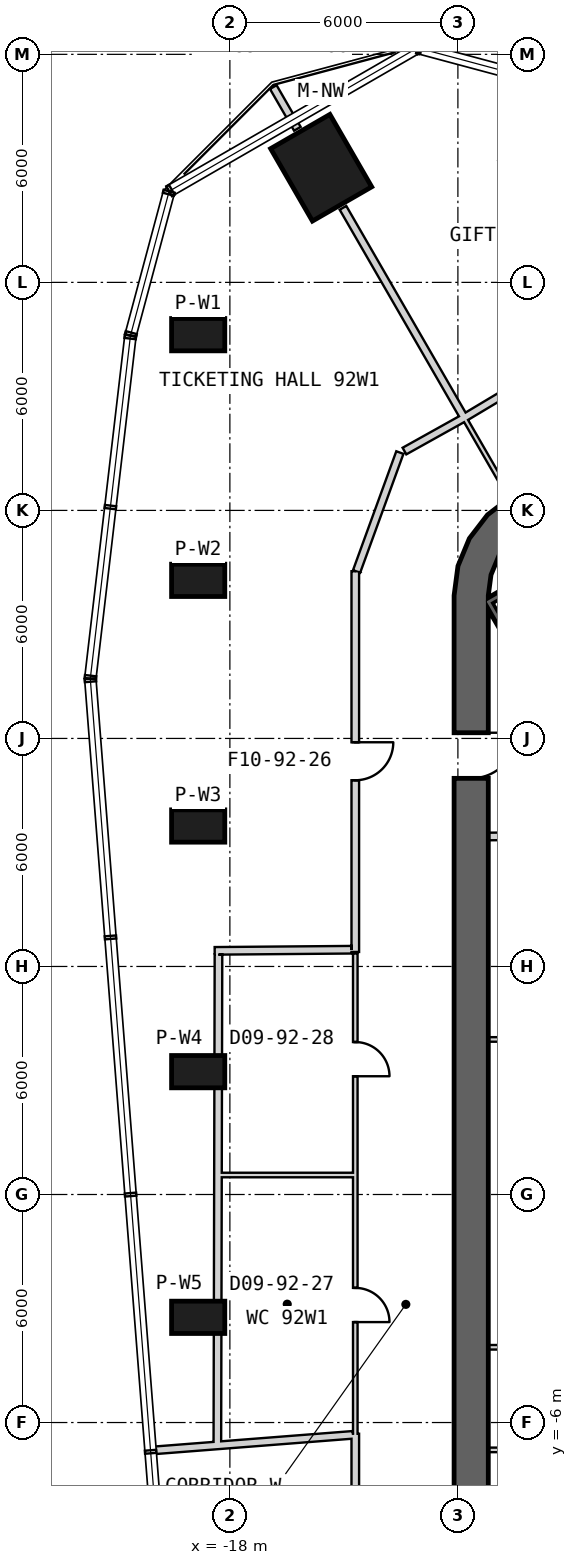
"""IFC4 building model, lengths in metres.
Left out: names, types, materials, properties, quantities, classifications, styles, units other than length and angle.
Written with IfcOpenShell. Run it as: python <this file> out.ifc"""

import sys

from ifc_helpers import new_model, si_unit, direction, frame, frame_2d, origin, origin_2d, place, context, subcontext, project, spatial, polyline, rectangle, outline, extrude, element, fill, save


model = new_model("IFC4")
c1 = context("Model", 3, precision=1e-05, world=origin(), true_north=direction((0.0, 1.0)))
c2 = subcontext(c1, "Body", "Model", "MODEL_VIEW")
j1 = project(units=[si_unit("LENGTHUNIT", "METRE"), si_unit("PLANEANGLEUNIT", "RADIAN")], contexts=[c1])
p1 = place(None, origin())
s1 = spatial("IfcSite", under=j1, at=p1, CompositionType="ELEMENT")
p2 = place(p1, origin())
s2 = spatial("IfcBuilding", under=s1, at=p2, CompositionType="ELEMENT")
p3 = place(p2, frame((0.0, 0.0, 404.8)))
s3 = spatial("IfcBuildingStorey", under=s2, at=p3, CompositionType="ELEMENT", Elevation=404.8)
p4 = place(p3, frame((-15.598, 27.016, 0.0), z_axis=(0.0, 0.0, 1.0), x_axis=(-0.5, 0.866025403784, 0.0)))
e1 = element("IfcColumn", 1, at=p4, inside=s3, PredefinedType="COLUMN", context=c2, shape_type="SweptSolid", body=[
    extrude(rectangle(XDim=2.2, YDim=1.8, at=origin_2d()), origin(), (0.0, 0.0, 1.0), 5.25),
])
for number, where, z_axis, x_axis in (
    (2, (-18.834, 22.624, 0.0), (0.0, 0.0, 1.0), (-1.0, 0.0, 0.0)),
    (3, (-18.834, 16.16, 0.0), (0.0, 0.0, 1.0), (-1.0, 0.0, 0.0)),
    (4, (-18.834, 9.696, 0.0), (0.0, 0.0, 1.0), (-1.0, 0.0, 0.0)),
    (5, (-18.834, 3.232, 0.0), (0.0, 0.0, 1.0), (-1.0, 0.0, 0.0)),
    (6, (-18.834, -3.232, 0.0), (0.0, 0.0, 1.0), (-1.0, 0.0, 0.0)),
):
    element("IfcColumn", number, at=place(p3, frame(where, z_axis=z_axis, x_axis=x_axis)), inside=s3, PredefinedType="COLUMN", context=c2, shape_type="SweptSolid", body=[
        extrude(rectangle(XDim=1.4, YDim=0.85, at=origin_2d()), origin(), (0.0, 0.0, 1.0), 5.25),
    ])
p5 = place(p3, frame((-11.65, 15.762, 0.0), z_axis=(0.0, 0.0, 1.0), x_axis=(0.0, -1.0, 0.0)))
e7 = element("IfcWall", 7, at=p5, inside=s3, PredefinedType="SHEAR", context=c2, shape_type="SweptSolid", body=[
    extrude(rectangle(XDim=31.523, YDim=0.9, at=frame_2d((15.762, 0.0))), origin(), (0.0, 0.0, 1.0), 5.5),
])
p6 = place(p5, frame((3.612, 0.0, 0.0)))
e8 = element("IfcOpeningElement", 8, at=p6, cuts=e7, PredefinedType="OPENING", context=c2, shape_type="SweptSolid", body=[
    extrude(rectangle(XDim=1.2, YDim=2.4, at=frame_2d((0.6, 1.2))), frame((0.0, 0.46, 0.0), z_axis=(0.0, -1.0, 0.0), x_axis=(1.0, 0.0, 0.0)), (0.0, 0.0, 1.0), 0.92),
])
p7 = place(p5, frame((26.712, 0.0, 0.0)))
e9 = element("IfcOpeningElement", 9, at=p7, cuts=e7, PredefinedType="OPENING", context=c2, shape_type="SweptSolid", body=[
    extrude(rectangle(XDim=1.2, YDim=2.4, at=frame_2d((0.6, 1.2))), frame((0.0, 0.46, 0.0), z_axis=(0.0, -1.0, 0.0), x_axis=(1.0, 0.0, 0.0)), (0.0, 0.0, 1.0), 0.92),
])
p8 = place(p3, origin())
e10 = element("IfcWall", 10, at=p8, inside=s3, PredefinedType="SHEAR", context=c2, shape_type="SweptSolid", body=[
    extrude(outline(polyline([(-7.6, 18.36), (-8.323, 18.659), (-9.1, 18.762), (-9.876, 18.659), (-10.6, 18.36), (-11.221, 17.883), (-11.698, 17.262), (-11.998, 16.538), (-12.1, 15.762), (-11.2, 15.762), (-11.128, 16.305), (-10.919, 16.812), (-10.585, 17.247), (-10.15, 17.58), (-9.644, 17.79), (-9.1, 17.862), (-8.556, 17.79), (-8.05, 17.58), (-7.6, 18.36)])), origin(), (0.0, 0.0, 1.0), 5.5),
])
p9 = place(p3, frame((-11.245, 15.678, -0.3), z_axis=(0.0, 0.0, 1.0), x_axis=(0.499977274689, -0.866038523851, 0.0)))
e11 = element("IfcWall", 11, at=p9, inside=s3, PredefinedType="SHEAR", context=c2, shape_type="SweptSolid", body=[
    extrude(rectangle(XDim=8.1, YDim=0.2, at=frame_2d((4.05, 0.0))), origin(), (0.0, 0.0, 1.0), 5.55),
])
p10 = place(p3, frame((-7.818, 17.541, -0.3), z_axis=(0.0, 0.0, 1.0), x_axis=(-0.866044365799, -0.499967155389, 0.0)))
e12 = element("IfcWall", 12, at=p10, inside=s3, PredefinedType="SHEAR", context=c2, shape_type="SweptSolid", body=[
    extrude(rectangle(XDim=3.8, YDim=0.2, at=frame_2d((1.9, 0.0))), origin(), (0.0, 0.0, 1.0), 5.55),
])
p11 = place(p3, frame((-7.95, 4.08, 0.0), z_axis=(0.0, 0.0, 1.0), x_axis=(-1.0, 0.0, 0.0)))
e13 = element("IfcWall", 13, at=p11, inside=s3, PredefinedType="PARTITIONING", context=c2, shape_type="SweptSolid", body=[
    extrude(rectangle(XDim=3.25, YDim=0.12, at=frame_2d((1.625, 0.0))), origin(), (0.0, 0.0, 1.0), 5.25),
])
p12 = place(p3, frame((-7.85, 9.451, 0.0), z_axis=(0.0, 0.0, 1.0), x_axis=(-0.999957167047, -0.009255488683, 0.0)))
e14 = element("IfcWall", 14, at=p12, inside=s3, PredefinedType="PARTITIONING", context=c2, shape_type="SweptSolid", body=[
    extrude(rectangle(XDim=3.35, YDim=0.2, at=frame_2d((1.675, 0.0))), origin(), (0.0, 0.0, 1.0), 5.25),
])
p13 = place(p3, frame((-11.2, -4.02, 0.0), z_axis=(0.0, 0.0, 1.0), x_axis=(1.0, 0.0, 0.0)))
e15 = element("IfcWall", 15, at=p13, inside=s3, PredefinedType="PARTITIONING", context=c2, shape_type="SweptSolid", body=[
    extrude(rectangle(XDim=3.25, YDim=0.12, at=frame_2d((1.625, 0.0))), origin(), (0.0, 0.0, 1.0), 5.25),
])
p14 = place(p13, frame((1.225, 0.0, 0.0)))
e16 = element("IfcOpeningElement", 16, at=p14, cuts=e15, PredefinedType="OPENING", context=c2, shape_type="SweptSolid", body=[
    extrude(rectangle(XDim=0.8, YDim=2.1, at=frame_2d((0.4, 1.05))), frame((0.0, 0.07, 0.0), z_axis=(0.0, -1.0, 0.0), x_axis=(1.0, 0.0, 0.0)), (0.0, 0.0, 1.0), 0.14),
])
p15 = place(p3, frame((-11.2, -6.72, 0.0), z_axis=(0.0, 0.0, 1.0), x_axis=(1.0, 0.0, 0.0)))
e17 = element("IfcWall", 17, at=p15, inside=s3, PredefinedType="PARTITIONING", context=c2, shape_type="SweptSolid", body=[
    extrude(rectangle(XDim=3.25, YDim=0.12, at=frame_2d((1.625, 0.0))), origin(), (0.0, 0.0, 1.0), 5.25),
])
p16 = place(p3, frame((-14.7, 16.399, 0.0), z_axis=(0.0, 0.0, 1.0), x_axis=(0.0, -1.0, 0.0)))
e18 = element("IfcWall", 18, at=p16, inside=s3, PredefinedType="PARTITIONING", context=c2, shape_type="SweptSolid", body=[
    extrude(rectangle(XDim=10.018, YDim=0.2, at=frame_2d((5.009, 0.0))), origin(), (0.0, 0.0, 1.0), 5.25),
])
p17 = place(p16, frame((4.5, 0.0, 0.0)))
e19 = element("IfcOpeningElement", 19, at=p17, cuts=e18, PredefinedType="OPENING", context=c2, shape_type="SweptSolid", body=[
    extrude(rectangle(XDim=1.0, YDim=2.1, at=frame_2d((0.5, 1.05))), frame((0.0, 0.11, 0.0), z_axis=(0.0, -1.0, 0.0), x_axis=(1.0, 0.0, 0.0)), (0.0, 0.0, 1.0), 0.22),
])
p18 = place(p3, frame((-14.7, -6.295, 0.0), z_axis=(0.0, 0.0, 1.0), x_axis=(0.0, -1.0, 0.0)))
e20 = element("IfcWall", 20, at=p18, inside=s3, PredefinedType="PARTITIONING", context=c2, shape_type="SweptSolid", body=[
    extrude(rectangle(XDim=9.905, YDim=0.2, at=frame_2d((4.952, 0.0))), origin(), (0.0, 0.0, 1.0), 5.25),
])
p19 = place(p18, frame((4.456, 0.0, 0.0)))
e21 = element("IfcOpeningElement", 21, at=p19, cuts=e20, PredefinedType="OPENING", context=c2, shape_type="SweptSolid", body=[
    extrude(rectangle(XDim=1.0, YDim=2.1, at=frame_2d((0.5, 1.05))), frame((0.0, 0.11, 0.0), z_axis=(0.0, -1.0, 0.0), x_axis=(1.0, 0.0, 0.0)), (0.0, 0.0, 1.0), 0.22),
])
p20 = place(p3, frame((-13.527, 19.522, 0.0), z_axis=(0.0, 0.0, 1.0), x_axis=(-0.341978542333, -0.939707761266, 0.0)))
e22 = element("IfcWall", 22, at=p20, inside=s3, PredefinedType="PARTITIONING", context=c2, shape_type="SweptSolid", body=[
    extrude(rectangle(XDim=3.33, YDim=0.2, at=frame_2d((1.665, 0.0))), origin(), (0.0, 0.0, 1.0), 5.25),
])
p21 = place(p3, frame((-11.808, 20.452, 0.0), z_axis=(0.0, 0.0, 1.0), x_axis=(-0.873514477635, -0.486798169021, 0.0)))
e23 = element("IfcWall", 23, at=p21, inside=s3, PredefinedType="PARTITIONING", context=c2, shape_type="SweptSolid", body=[
    extrude(rectangle(XDim=1.83, YDim=0.2, at=frame_2d((0.915, 0.0))), origin(), (0.0, 0.0, 1.0), 3.02),
])
p22 = place(p3, frame((-14.7, 6.341, 0.0), z_axis=(0.0, 0.0, 1.0), x_axis=(0.0, -1.0, 0.0)))
e24 = element("IfcWall", 24, at=p22, inside=s3, PredefinedType="PARTITIONING", context=c2, shape_type="SweptSolid", body=[
    extrude(rectangle(XDim=5.829, YDim=0.12, at=frame_2d((2.914, 0.0))), origin(), (0.0, 0.0, 1.0), 5.25),
])
p23 = place(p22, frame((2.33, 0.0, 0.0)))
e25 = element("IfcOpeningElement", 25, at=p23, cuts=e24, PredefinedType="OPENING", context=c2, shape_type="SweptSolid", body=[
    extrude(rectangle(XDim=0.9, YDim=2.1, at=frame_2d((0.45, 1.05))), frame((0.0, 0.07, 0.0), z_axis=(0.0, -1.0, 0.0), x_axis=(1.0, 0.0, 0.0)), (0.0, 0.0, 1.0), 0.14),
])
p24 = place(p3, frame((-14.7, 0.513, 0.0), z_axis=(0.0, 0.0, 1.0), x_axis=(0.0, -1.0, 0.0)))
e26 = element("IfcWall", 26, at=p24, inside=s3, PredefinedType="PARTITIONING", context=c2, shape_type="SweptSolid", body=[
    extrude(rectangle(XDim=6.808, YDim=0.12, at=frame_2d((3.404, 0.0))), origin(), (0.0, 0.0, 1.0), 5.25),
])
p25 = place(p24, frame((2.97, 0.0, 0.0)))
e27 = element("IfcOpeningElement", 27, at=p25, cuts=e26, PredefinedType="OPENING", context=c2, shape_type="SweptSolid", body=[
    extrude(rectangle(XDim=0.9, YDim=2.1, at=frame_2d((0.45, 1.05))), frame((0.0, 0.07, 0.0), z_axis=(0.0, -1.0, 0.0), x_axis=(1.0, 0.0, 0.0)), (0.0, 0.0, 1.0), 0.14),
])
p26 = place(p3, frame((-11.849, 20.463, 0.0), z_axis=(0.0, 0.0, 1.0), x_axis=(0.500047596559, -0.865997922154, 0.0)))
e28 = element("IfcWall", 28, at=p26, inside=s3, PredefinedType="PARTITIONING", context=c2, shape_type="SweptSolid", body=[
    extrude(rectangle(XDim=2.6, YDim=0.12, at=frame_2d((1.3, 0.0))), origin(), (0.0, 0.0, 1.0), 3.02),
])
p27 = place(p3, frame((-18.3, 6.312, 0.0), z_axis=(0.0, 0.0, 1.0), x_axis=(-0.002282237823, -0.999997395692, 0.0)))
e29 = element("IfcWall", 29, at=p27, inside=s3, PredefinedType="PARTITIONING", context=c2, shape_type="SweptSolid", body=[
    extrude(rectangle(XDim=12.944, YDim=0.2, at=frame_2d((6.472, 0.0))), origin(), (0.0, 0.0, 1.0), 5.25),
])
p28 = place(p3, frame((-18.4, 6.411, 0.0), z_axis=(0.0, 0.0, 1.0), x_axis=(0.999965208912, 0.008341520563, 0.0)))
e30 = element("IfcWall", 30, at=p28, inside=s3, PredefinedType="PARTITIONING", context=c2, shape_type="SweptSolid", body=[
    extrude(rectangle(XDim=3.6, YDim=0.2, at=frame_2d((1.8, 0.0))), origin(), (0.0, 0.0, 1.0), 5.25),
])
p29 = place(p3, frame((-20.087, -6.74, 0.0), z_axis=(0.0, 0.0, 1.0), x_axis=(0.996972211826, 0.077758657691, 0.0)))
e31 = element("IfcWall", 31, at=p29, inside=s3, PredefinedType="PARTITIONING", context=c2, shape_type="SweptSolid", body=[
    extrude(rectangle(XDim=1.793, YDim=0.2, at=frame_2d((0.896, 0.0))), origin(), (0.0, 0.0, 1.0), 5.25),
])
p30 = place(p3, frame((-11.849, 20.463, 0.0), z_axis=(0.0, 0.0, 1.0), x_axis=(-0.499993152284, 0.866029357279, 0.0)))
e32 = element("IfcWall", 32, at=p30, inside=s3, PredefinedType="PARTITIONING", context=c2, shape_type="SweptSolid", body=[
    extrude(rectangle(XDim=6.35, YDim=0.2, at=frame_2d((3.175, 0.0))), origin(), (0.0, 0.0, 1.0), 3.02),
])
p31 = place(p3, frame((-16.224, 28.041, 0.0), z_axis=(0.0, 0.0, 1.0), x_axis=(-0.499950289094, 0.866054102487, 0.0)))
e33 = element("IfcWall", 33, at=p31, inside=s3, PredefinedType="PARTITIONING", context=c2, shape_type="SweptSolid", body=[
    extrude(rectangle(XDim=1.268, YDim=0.2, at=frame_2d((0.634, 0.0))), origin(), (0.0, 0.0, 1.0), 5.25),
])
p32 = place(p3, frame((-14.76, 0.513, 0.0), z_axis=(0.0, 0.0, 1.0), x_axis=(-1.0, 0.0, 0.0)))
e34 = element("IfcWall", 34, at=p32, inside=s3, PredefinedType="PARTITIONING", context=c2, shape_type="SweptSolid", body=[
    extrude(rectangle(XDim=3.54, YDim=0.12, at=frame_2d((1.77, 0.0))), origin(), (0.0, 0.0, 1.0), 5.25),
])
p33 = place(p3, frame((-14.76, -6.324, 0.0), z_axis=(0.0, 0.0, 1.0), x_axis=(-0.99696647774, -0.077832141573, 0.0)))
e35 = element("IfcWall", 35, at=p33, inside=s3, PredefinedType="PARTITIONING", context=c2, shape_type="SweptSolid", body=[
    extrude(rectangle(XDim=3.551, YDim=0.2, at=frame_2d((1.775, 0.0))), origin(), (0.0, 0.0, 1.0), 5.25),
])
p34 = place(p3, frame((-10.074, 21.489, 0.0), z_axis=(0.0, 0.0, 1.0), x_axis=(-0.858323699828, -0.513108591152, 0.0)))
e36 = element("IfcWall", 36, at=p34, inside=s3, PredefinedType="PARTITIONING", context=c2, shape_type="SweptSolid", body=[
    extrude(rectangle(XDim=2.02, YDim=0.2, at=frame_2d((1.01, 0.0))), origin(), (0.0, 0.0, 1.0), 3.02),
])
p35 = place(p17, origin())
e37 = element("IfcDoor", 37, at=p35, inside=s3, OperationType="SINGLE_SWING_LEFT", PredefinedType="USERDEFINED", context=c2, shape_type="SweptSolid", body=[
    extrude(rectangle(XDim=1.0, YDim=2.1, at=frame_2d((0.5, 1.05))), frame((0.0, 0.025, 0.0), z_axis=(0.0, -1.0, 0.0), x_axis=(1.0, 0.0, 0.0)), (0.0, 0.0, 1.0), 0.05),
])
fill(e19, e37)
p36 = place(p25, origin())
e38 = element("IfcDoor", 38, at=p36, inside=s3, OperationType="SINGLE_SWING_RIGHT", PredefinedType="NOTDEFINED", context=c2, shape_type="SweptSolid", body=[
    extrude(rectangle(XDim=0.9, YDim=2.1, at=frame_2d((0.45, 1.05))), frame((0.0, 0.025, 0.0), z_axis=(0.0, -1.0, 0.0), x_axis=(1.0, 0.0, 0.0)), (0.0, 0.0, 1.0), 0.05),
])
fill(e27, e38)
p37 = place(p23, origin())
e39 = element("IfcDoor", 39, at=p37, inside=s3, OperationType="SINGLE_SWING_RIGHT", PredefinedType="NOTDEFINED", context=c2, shape_type="SweptSolid", body=[
    extrude(rectangle(XDim=0.9, YDim=2.1, at=frame_2d((0.45, 1.05))), frame((0.0, 0.025, 0.0), z_axis=(0.0, -1.0, 0.0), x_axis=(1.0, 0.0, 0.0)), (0.0, 0.0, 1.0), 0.05),
])
fill(e25, e39)
p38 = place(p6, origin())
e40 = element("IfcDoor", 40, at=p38, inside=s3, OperationType="SINGLE_SWING_LEFT", PredefinedType="USERDEFINED", context=c2, shape_type="SweptSolid", body=[
    extrude(rectangle(XDim=1.2, YDim=2.4, at=frame_2d((0.6, 1.2))), frame((0.0, 0.025, 0.0), z_axis=(0.0, -1.0, 0.0), x_axis=(1.0, 0.0, 0.0)), (0.0, 0.0, 1.0), 0.05),
])
fill(e8, e40)
save(model, sys.argv[1])
